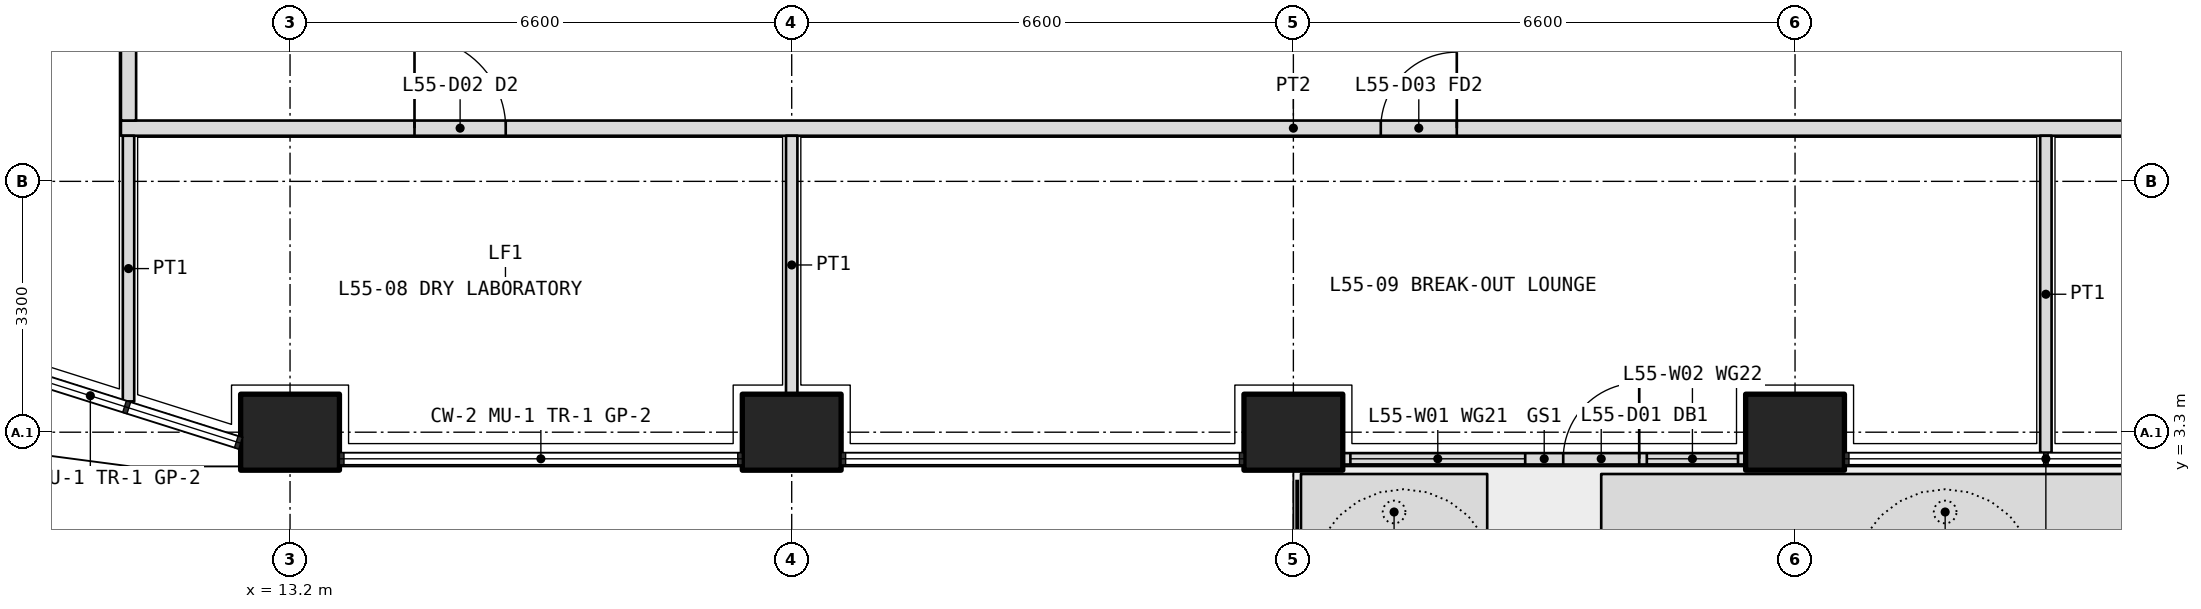
"""IFC4 building model, lengths in metres.
Left out: names, types, materials, properties, quantities, classifications, styles, units other than length and angle.
Written with IfcOpenShell. Run it as: python <this file> out.ifc"""

import sys

from ifc_helpers import new_model, si_unit, direction, frame, frame_2d, origin, origin_2d, place, context, subcontext, project, spatial, polyline, rectangle, outline, extrude, element, fill, save


model = new_model("IFC4")
c1 = context("Model", 3, precision=1e-05, world=origin(), true_north=direction((0.0, 1.0)))
c2 = subcontext(c1, "Body", "Model", "MODEL_VIEW")
j1 = project(units=[si_unit("LENGTHUNIT", "METRE"), si_unit("PLANEANGLEUNIT", "RADIAN")], contexts=[c1])
p1 = place(None, origin())
s1 = spatial("IfcSite", under=j1, at=p1, CompositionType="ELEMENT")
p2 = place(p1, origin())
s2 = spatial("IfcBuilding", under=s1, at=p2, CompositionType="ELEMENT")
p3 = place(p2, frame((0.0, 0.0, 241.8)))
s3 = spatial("IfcBuildingStorey", under=s2, at=p3, CompositionType="ELEMENT", Elevation=241.8)
for number, where, z_axis, x_axis in (
    (1, (13.2, 3.3, 0.0), (0.0, 0.0, 1.0), (1.0, 0.0, 0.0)),
    (2, (19.8, 3.3, 0.0), (0.0, 0.0, 1.0), (1.0, 0.0, 0.0)),
    (3, (26.4, 3.3, 0.0), (0.0, 0.0, 1.0), (1.0, 0.0, 0.0)),
    (4, (33.0, 3.3, 0.0), (0.0, 0.0, 1.0), (1.0, 0.0, 0.0)),
):
    element("IfcColumn", number, at=place(p3, frame(where, z_axis=z_axis, x_axis=x_axis)), inside=s3, PredefinedType="COLUMN", context=c2, shape_type="SweptSolid", body=[
        extrude(rectangle(XDim=1.3, YDim=1.0, at=origin_2d()), origin(), (0.0, 0.0, 1.0), 4.2),
    ])
p4 = place(p3, origin())
e5 = element("IfcWall", 5, at=p4, inside=s3, PredefinedType="USERDEFINED", context=c2, shape_type="SweptSolid", body=[
    extrude(outline(polyline([(26.5, 1.75), (28.95, 1.75), (28.95, 2.75), (26.5, 2.75), (26.5, 1.75)]), holes=[polyline([(26.65, 1.9), (28.8, 1.9), (28.8, 2.6), (26.65, 2.6), (26.65, 1.9)])]), origin(), (0.0, 0.0, 1.0), 1.05),
])
p5 = place(p3, origin())
e6 = element("IfcWall", 6, at=p5, inside=s3, PredefinedType="USERDEFINED", context=c2, shape_type="SweptSolid", body=[
    extrude(outline(polyline([(30.45, 1.75), (39.5, 1.75), (39.5, 2.75), (30.45, 2.75), (30.45, 1.75)]), holes=[polyline([(30.6, 1.9), (39.35, 1.9), (39.35, 2.6), (30.6, 2.6), (30.6, 1.9)])]), origin(), (0.0, 0.0, 1.0), 1.05),
])
p6 = place(p3, frame((27.05, 2.95, 0.0), z_axis=(0.0, 0.0, 1.0), x_axis=(1.0, 0.0, 0.0)))
e7 = element("IfcWall", 7, at=p6, inside=s3, PredefinedType="SOLIDWALL", context=c2, shape_type="SweptSolid", body=[
    extrude(rectangle(XDim=5.3, YDim=0.15, at=frame_2d((2.65, 0.0))), origin(), (0.0, 0.0, 1.0), 2.7),
])
p7 = place(p6, frame((2.9, 0.0, 0.0)))
e8 = element("IfcOpeningElement", 8, at=p7, cuts=e7, PredefinedType="OPENING", context=c2, shape_type="SweptSolid", body=[
    extrude(rectangle(XDim=1.0, YDim=2.4, at=frame_2d((0.5, 1.2))), frame((0.0, 0.085, 0.0), z_axis=(0.0, -1.0, 0.0), x_axis=(1.0, 0.0, 0.0)), (0.0, 0.0, 1.0), 0.17),
])
p8 = place(p6, frame((0.1, 0.0, 0.1)))
e9 = element("IfcOpeningElement", 9, at=p8, cuts=e7, PredefinedType="OPENING", context=c2, shape_type="SweptSolid", body=[
    extrude(rectangle(XDim=2.3, YDim=2.3, at=frame_2d((1.15, 1.15))), frame((0.0, 0.085, 0.0), z_axis=(0.0, -1.0, 0.0), x_axis=(1.0, 0.0, 0.0)), (0.0, 0.0, 1.0), 0.17),
])
p9 = place(p6, frame((4.0, 0.0, 0.1)))
e10 = element("IfcOpeningElement", 10, at=p9, cuts=e7, PredefinedType="OPENING", context=c2, shape_type="SweptSolid", body=[
    extrude(rectangle(XDim=1.2, YDim=2.3, at=frame_2d((0.6, 1.15))), frame((0.0, 0.085, 0.0), z_axis=(0.0, -1.0, 0.0), x_axis=(1.0, 0.0, 0.0)), (0.0, 0.0, 1.0), 0.17),
])
p10 = place(p3, frame((10.975, 7.3, 0.0), z_axis=(0.0, 0.0, 1.0), x_axis=(1.0, 0.0, 0.0)))
e11 = element("IfcWall", 11, at=p10, inside=s3, PredefinedType="PARTITIONING", context=c2, shape_type="SweptSolid", body=[
    extrude(rectangle(XDim=30.85, YDim=0.2, at=frame_2d((15.425, 0.0))), origin(), (0.0, 0.0, 1.0), 3.0),
])
p11 = place(p10, frame((3.863, 0.0, 0.0)))
e12 = element("IfcOpeningElement", 12, at=p11, cuts=e11, PredefinedType="OPENING", context=c2, shape_type="SweptSolid", body=[
    extrude(rectangle(XDim=1.2, YDim=2.1, at=frame_2d((0.6, 1.05))), frame((0.0, 0.11, 0.0), z_axis=(0.0, -1.0, 0.0), x_axis=(1.0, 0.0, 0.0)), (0.0, 0.0, 1.0), 0.22),
])
p12 = place(p10, frame((16.575, 0.0, 0.0)))
e13 = element("IfcOpeningElement", 13, at=p12, cuts=e11, PredefinedType="OPENING", context=c2, shape_type="SweptSolid", body=[
    extrude(rectangle(XDim=1.0, YDim=2.1, at=frame_2d((0.5, 1.05))), frame((0.0, 0.11, 0.0), z_axis=(0.0, -1.0, 0.0), x_axis=(1.0, 0.0, 0.0)), (0.0, 0.0, 1.0), 0.22),
])
p13 = place(p10, frame((27.538, 0.0, 0.0)))
e14 = element("IfcOpeningElement", 14, at=p13, cuts=e11, PredefinedType="OPENING", context=c2, shape_type="SweptSolid", body=[
    extrude(rectangle(XDim=1.0, YDim=2.1, at=frame_2d((0.5, 1.05))), frame((0.0, 0.11, 0.0), z_axis=(0.0, -1.0, 0.0), x_axis=(1.0, 0.0, 0.0)), (0.0, 0.0, 1.0), 0.22),
])
p14 = place(p3, frame((11.075, 7.4, 0.0), z_axis=(0.0, 0.0, 1.0), x_axis=(0.0, 1.0, 0.0)))
e15 = element("IfcWall", 15, at=p14, inside=s3, PredefinedType="PARTITIONING", context=c2, shape_type="SweptSolid", body=[
    extrude(rectangle(XDim=31.4, YDim=0.2, at=frame_2d((15.7, 0.0))), origin(), (0.0, 0.0, 1.0), 3.0),
])
p15 = place(p14, frame((2.35, 0.0, 0.0)))
e16 = element("IfcOpeningElement", 16, at=p15, cuts=e15, PredefinedType="OPENING", context=c2, shape_type="SweptSolid", body=[
    extrude(rectangle(XDim=1.0, YDim=2.1, at=frame_2d((0.5, 1.05))), frame((0.0, 0.11, 0.0), z_axis=(0.0, -1.0, 0.0), x_axis=(1.0, 0.0, 0.0)), (0.0, 0.0, 1.0), 0.22),
])
p16 = place(p14, frame((6.35, 0.0, 0.0)))
e17 = element("IfcOpeningElement", 17, at=p16, cuts=e15, PredefinedType="OPENING", context=c2, shape_type="SweptSolid", body=[
    extrude(rectangle(XDim=1.0, YDim=2.1, at=frame_2d((0.5, 1.05))), frame((0.0, 0.11, 0.0), z_axis=(0.0, -1.0, 0.0), x_axis=(1.0, 0.0, 0.0)), (0.0, 0.0, 1.0), 0.22),
])
p17 = place(p14, frame((9.45, 0.0, 0.0)))
e18 = element("IfcOpeningElement", 18, at=p17, cuts=e15, PredefinedType="OPENING", context=c2, shape_type="SweptSolid", body=[
    extrude(rectangle(XDim=0.9, YDim=2.1, at=frame_2d((0.45, 1.05))), frame((0.0, 0.11, 0.0), z_axis=(0.0, -1.0, 0.0), x_axis=(1.0, 0.0, 0.0)), (0.0, 0.0, 1.0), 0.22),
])
p18 = place(p14, frame((13.35, 0.0, 0.0)))
e19 = element("IfcOpeningElement", 19, at=p18, cuts=e15, PredefinedType="OPENING", context=c2, shape_type="SweptSolid", body=[
    extrude(rectangle(XDim=0.9, YDim=2.1, at=frame_2d((0.45, 1.05))), frame((0.0, 0.11, 0.0), z_axis=(0.0, -1.0, 0.0), x_axis=(1.0, 0.0, 0.0)), (0.0, 0.0, 1.0), 0.22),
])
p19 = place(p14, frame((20.15, 0.0, 0.0)))
e20 = element("IfcOpeningElement", 20, at=p19, cuts=e15, PredefinedType="OPENING", context=c2, shape_type="SweptSolid", body=[
    extrude(rectangle(XDim=1.0, YDim=2.1, at=frame_2d((0.5, 1.05))), frame((0.0, 0.11, 0.0), z_axis=(0.0, -1.0, 0.0), x_axis=(1.0, 0.0, 0.0)), (0.0, 0.0, 1.0), 0.22),
])
p20 = place(p14, frame((28.05, 0.0, 0.0)))
e21 = element("IfcOpeningElement", 21, at=p20, cuts=e15, PredefinedType="OPENING", context=c2, shape_type="SweptSolid", body=[
    extrude(rectangle(XDim=1.0, YDim=2.1, at=frame_2d((0.5, 1.05))), frame((0.0, 0.11, 0.0), z_axis=(0.0, -1.0, 0.0), x_axis=(1.0, 0.0, 0.0)), (0.0, 0.0, 1.0), 0.22),
])
p21 = place(p3, frame((11.075, 3.705, 0.0), z_axis=(0.0, 0.0, 1.0), x_axis=(0.0, 1.0, 0.0)))
e22 = element("IfcWall", 22, at=p21, inside=s3, PredefinedType="PARTITIONING", context=c2, shape_type="SweptSolid", body=[
    extrude(rectangle(XDim=3.495, YDim=0.15, at=frame_2d((1.748, 0.0))), origin(), (0.0, 0.0, 1.0), 2.7),
])
p22 = place(p3, frame((19.8, 3.8, 0.0), z_axis=(0.0, 0.0, 1.0), x_axis=(0.0, 1.0, 0.0)))
e23 = element("IfcWall", 23, at=p22, inside=s3, PredefinedType="PARTITIONING", context=c2, shape_type="SweptSolid", body=[
    extrude(rectangle(XDim=3.4, YDim=0.15, at=frame_2d((1.7, 0.0))), origin(), (0.0, 0.0, 1.0), 3.0),
])
p23 = place(p3, frame((36.3, 3.03, 0.0), z_axis=(0.0, 0.0, 1.0), x_axis=(0.0, 1.0, 0.0)))
e24 = element("IfcWall", 24, at=p23, inside=s3, PredefinedType="PARTITIONING", context=c2, shape_type="SweptSolid", body=[
    extrude(rectangle(XDim=4.17, YDim=0.15, at=frame_2d((2.085, 0.0))), origin(), (0.0, 0.0, 1.0), 2.7),
])
p24 = place(p7, origin())
e25 = element("IfcDoor", 25, at=p24, inside=s3, OperationType="SINGLE_SWING_RIGHT", PredefinedType="DOOR", context=c2, shape_type="SweptSolid", body=[
    extrude(rectangle(XDim=1.0, YDim=2.4, at=frame_2d((0.5, 1.2))), frame((0.0, 0.025, 0.0), z_axis=(0.0, -1.0, 0.0), x_axis=(1.0, 0.0, 0.0)), (0.0, 0.0, 1.0), 0.05),
])
fill(e8, e25)
p25 = place(p8, origin())
e26 = element("IfcWindow", 26, at=p25, inside=s3, PartitioningType="SINGLE_PANEL", PredefinedType="WINDOW", context=c2, shape_type="SweptSolid", body=[
    extrude(rectangle(XDim=2.3, YDim=2.3, at=frame_2d((1.15, 1.15))), frame((0.0, 0.03, 0.0), z_axis=(0.0, -1.0, 0.0), x_axis=(1.0, 0.0, 0.0)), (0.0, 0.0, 1.0), 0.06),
])
fill(e9, e26)
p26 = place(p9, origin())
e27 = element("IfcWindow", 27, at=p26, inside=s3, PartitioningType="SINGLE_PANEL", PredefinedType="WINDOW", context=c2, shape_type="SweptSolid", body=[
    extrude(rectangle(XDim=1.2, YDim=2.3, at=frame_2d((0.6, 1.15))), frame((0.0, 0.03, 0.0), z_axis=(0.0, -1.0, 0.0), x_axis=(1.0, 0.0, 0.0)), (0.0, 0.0, 1.0), 0.06),
])
fill(e10, e27)
p27 = place(p11, origin())
e28 = element("IfcDoor", 28, at=p27, inside=s3, OperationType="DOUBLE_DOOR_SINGLE_SWING", PredefinedType="DOOR", context=c2, shape_type="SweptSolid", body=[
    extrude(rectangle(XDim=1.2, YDim=2.1, at=frame_2d((0.6, 1.05))), frame((0.0, 0.025, 0.0), z_axis=(0.0, -1.0, 0.0), x_axis=(1.0, 0.0, 0.0)), (0.0, 0.0, 1.0), 0.05),
])
fill(e12, e28)
p28 = place(p12, origin())
e29 = element("IfcDoor", 29, at=p28, inside=s3, OperationType="SINGLE_SWING_RIGHT", PredefinedType="DOOR", context=c2, shape_type="SweptSolid", body=[
    extrude(rectangle(XDim=1.0, YDim=2.1, at=frame_2d((0.5, 1.05))), frame((0.0, 0.025, 0.0), z_axis=(0.0, -1.0, 0.0), x_axis=(1.0, 0.0, 0.0)), (0.0, 0.0, 1.0), 0.05),
])
fill(e13, e29)
save(model, sys.argv[1])
